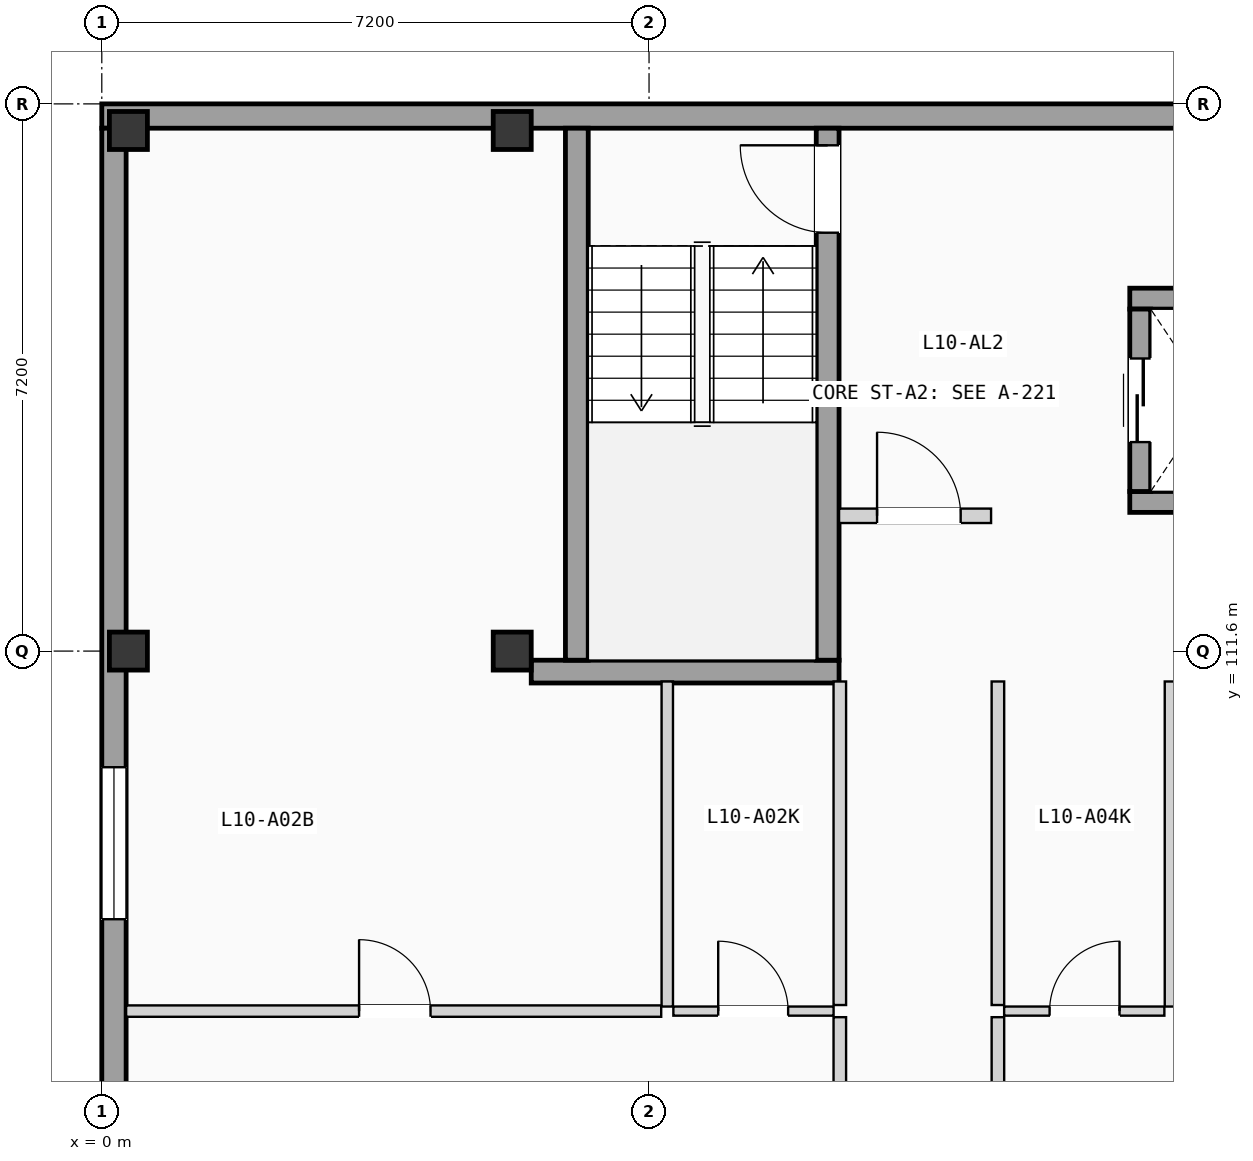
"""IFC4 building model, lengths in metres.
Left out: names, types, materials, properties, quantities, classifications, styles, units other than length and angle.
Written with IfcOpenShell. Run it as: python <this file> out.ifc"""

import sys

from ifc_helpers import new_model, si_unit, direction, frame, frame_2d, origin, origin_2d, place, context, subcontext, project, spatial, rectangle, extrude, element, fill, save


model = new_model("IFC4")
c1 = context("Model", 3, precision=1e-05, world=origin(), true_north=direction((0.0, 1.0)))
c2 = subcontext(c1, "Body", "Model", "MODEL_VIEW")
j1 = project(units=[si_unit("LENGTHUNIT", "METRE"), si_unit("PLANEANGLEUNIT", "RADIAN")], contexts=[c1])
p1 = place(None, origin())
s1 = spatial("IfcSite", under=j1, at=p1, CompositionType="ELEMENT")
p2 = place(p1, origin())
s2 = spatial("IfcBuilding", under=s1, at=p2, CompositionType="ELEMENT")
p3 = place(p2, frame((0.0, 0.0, 34.125)))
s3 = spatial("IfcBuildingStorey", under=s2, at=p3, CompositionType="ELEMENT", Elevation=34.125)
for number, where, z_axis, x_axis in (
    (1, (0.35, 111.6, 0.0), (0.0, 0.0, 1.0), (1.0, 0.0, 0.0)),
    (2, (0.35, 118.45, 0.0), (0.0, 0.0, 1.0), (1.0, 0.0, 0.0)),
    (3, (5.4, 111.6, 0.0), (0.0, 0.0, 1.0), (1.0, 0.0, 0.0)),
    (4, (5.4, 118.45, 0.0), (0.0, 0.0, 1.0), (1.0, 0.0, 0.0)),
):
    element("IfcColumn", number, at=place(p3, frame(where, z_axis=z_axis, x_axis=x_axis)), inside=s3, PredefinedType="COLUMN", context=c2, shape_type="SweptSolid", body=[
        extrude(rectangle(XDim=0.5, YDim=0.5, at=origin_2d()), origin(), (0.0, 0.0, 1.0), 3.15),
    ])
p4 = place(p3, frame((0.0, 118.64, 0.0), z_axis=(0.0, 0.0, 1.0), x_axis=(1.0, 0.0, 0.0)))
e5 = element("IfcWall", 5, at=p4, inside=s3, PredefinedType="SOLIDWALL", context=c2, shape_type="SweptSolid", body=[
    extrude(rectangle(XDim=21.6, YDim=0.32, at=frame_2d((10.8, 0.0))), origin(), (0.0, 0.0, 1.0), 2.89),
])
p5 = place(p3, frame((0.16, 68.72, 0.0), z_axis=(0.0, 0.0, 1.0), x_axis=(0.0, 1.0, 0.0)))
e6 = element("IfcWall", 6, at=p5, inside=s3, PredefinedType="SOLIDWALL", context=c2, shape_type="SweptSolid", body=[
    extrude(rectangle(XDim=49.76, YDim=0.32, at=frame_2d((24.88, 0.0))), origin(), (0.0, 0.0, 1.0), 2.89),
])
p6 = place(p5, frame((16.755, 0.0, 0.705)))
e7 = element("IfcOpeningElement", 7, at=p6, cuts=e6, PredefinedType="OPENING", context=c2, shape_type="SweptSolid", body=[
    extrude(rectangle(XDim=1.85, YDim=1.5, at=frame_2d((0.925, 0.75))), frame((0.0, 0.17, 0.0), z_axis=(0.0, -1.0, 0.0), x_axis=(1.0, 0.0, 0.0)), (0.0, 0.0, 1.0), 0.34),
])
p7 = place(p5, frame((9.62, 0.0, 0.555)))
e8 = element("IfcOpeningElement", 8, at=p7, cuts=e6, PredefinedType="OPENING", context=c2, shape_type="SweptSolid", body=[
    extrude(rectangle(XDim=1.85, YDim=1.65, at=frame_2d((0.925, 0.825))), frame((0.0, 0.17, 0.0), z_axis=(0.0, -1.0, 0.0), x_axis=(1.0, 0.0, 0.0)), (0.0, 0.0, 1.0), 0.34),
])
p8 = place(p5, frame((24.405, 0.0, 0.85)))
e9 = element("IfcOpeningElement", 9, at=p8, cuts=e6, PredefinedType="OPENING", context=c2, shape_type="SweptSolid", body=[
    extrude(rectangle(XDim=0.95, YDim=1.2, at=frame_2d((0.475, 0.6))), frame((0.0, 0.17, 0.0), z_axis=(0.0, -1.0, 0.0), x_axis=(1.0, 0.0, 0.0)), (0.0, 0.0, 1.0), 0.34),
])
p9 = place(p5, frame((33.159, 0.0, 0.9)))
e10 = element("IfcOpeningElement", 10, at=p9, cuts=e6, PredefinedType="OPENING", context=c2, shape_type="SweptSolid", body=[
    extrude(rectangle(XDim=2.0, YDim=1.2, at=frame_2d((1.0, 0.6))), frame((0.0, 0.17, 0.0), z_axis=(0.0, -1.0, 0.0), x_axis=(1.0, 0.0, 0.0)), (0.0, 0.0, 1.0), 0.34),
])
p10 = place(p5, frame((29.749, 0.0, 0.855)))
e11 = element("IfcOpeningElement", 11, at=p10, cuts=e6, PredefinedType="OPENING", context=c2, shape_type="SweptSolid", body=[
    extrude(rectangle(XDim=2.0, YDim=1.35, at=frame_2d((1.0, 0.675))), frame((0.0, 0.17, 0.0), z_axis=(0.0, -1.0, 0.0), x_axis=(1.0, 0.0, 0.0)), (0.0, 0.0, 1.0), 0.34),
])
p11 = place(p5, frame((39.352, 0.0, 0.705)))
e12 = element("IfcOpeningElement", 12, at=p11, cuts=e6, PredefinedType="OPENING", context=c2, shape_type="SweptSolid", body=[
    extrude(rectangle(XDim=2.0, YDim=1.5, at=frame_2d((1.0, 0.75))), frame((0.0, 0.17, 0.0), z_axis=(0.0, -1.0, 0.0), x_axis=(1.0, 0.0, 0.0)), (0.0, 0.0, 1.0), 0.34),
])
p12 = place(p3, frame((5.65, 111.33, 0.0), z_axis=(0.0, 0.0, 1.0), x_axis=(1.0, 0.0, 0.0)))
e13 = element("IfcWall", 13, at=p12, inside=s3, PredefinedType="SHEAR", context=c2, shape_type="SweptSolid", body=[
    extrude(rectangle(XDim=4.05, YDim=0.3, at=frame_2d((2.025, 0.0))), origin(), (0.0, 0.0, 1.0), 2.89),
])
p13 = place(p3, frame((6.25, 111.48, 0.0), z_axis=(0.0, 0.0, 1.0), x_axis=(0.0, 1.0, 0.0)))
e14 = element("IfcWall", 14, at=p13, inside=s3, PredefinedType="SHEAR", context=c2, shape_type="SweptSolid", body=[
    extrude(rectangle(XDim=7.0, YDim=0.3, at=frame_2d((3.5, 0.0))), origin(), (0.0, 0.0, 1.0), 2.89),
])
p14 = place(p3, frame((9.55, 111.48, 0.0), z_axis=(0.0, 0.0, 1.0), x_axis=(0.0, 1.0, 0.0)))
e15 = element("IfcWall", 15, at=p14, inside=s3, PredefinedType="SHEAR", context=c2, shape_type="SweptSolid", body=[
    extrude(rectangle(XDim=7.0, YDim=0.3, at=frame_2d((3.5, 0.0))), origin(), (0.0, 0.0, 1.0), 2.89),
])
p15 = place(p14, frame((5.625, 0.0, 0.0)))
e16 = element("IfcOpeningElement", 16, at=p15, cuts=e15, PredefinedType="OPENING", context=c2, shape_type="SweptSolid", body=[
    extrude(rectangle(XDim=1.15, YDim=2.12, at=frame_2d((0.575, 1.06))), frame((0.0, 0.16, 0.0), z_axis=(0.0, -1.0, 0.0), x_axis=(1.0, 0.0, 0.0)), (0.0, 0.0, 1.0), 0.32),
])
for number, where, z_axis, x_axis in (
    (17, (13.525, 113.562, 0.0), (0.0, 0.0, 1.0), (1.0, 0.0, 0.0)),
    (18, (13.525, 116.238, 0.0), (0.0, 0.0, 1.0), (1.0, 0.0, 0.0)),
):
    element("IfcWall", number, at=place(p3, frame(where, z_axis=z_axis, x_axis=x_axis)), inside=s3, PredefinedType="SHEAR", context=c2, shape_type="SweptSolid", body=[
        extrude(rectangle(XDim=2.15, YDim=0.275, at=frame_2d((1.075, 0.0))), origin(), (0.0, 0.0, 1.0), 2.89),
    ])
p16 = place(p3, frame((13.663, 113.7, 0.0), z_axis=(0.0, 0.0, 1.0), x_axis=(0.0, 1.0, 0.0)))
e19 = element("IfcWall", 19, at=p16, inside=s3, PredefinedType="SHEAR", context=c2, shape_type="SweptSolid", body=[
    extrude(rectangle(XDim=2.4, YDim=0.275, at=frame_2d((1.2, 0.0))), origin(), (0.0, 0.0, 1.0), 2.89),
])
p17 = place(p16, frame((0.65, 0.0, 0.0)))
e20 = element("IfcOpeningElement", 20, at=p17, cuts=e19, PredefinedType="OPENING", context=c2, shape_type="SweptSolid", body=[
    extrude(rectangle(XDim=1.1, YDim=2.15, at=frame_2d((0.55, 1.075))), frame((0.0, 0.147, 0.0), z_axis=(0.0, -1.0, 0.0), x_axis=(1.0, 0.0, 0.0)), (0.0, 0.0, 1.0), 0.295),
])
p18 = place(p3, frame((9.7, 113.38, 0.0), z_axis=(0.0, 0.0, 1.0), x_axis=(1.0, 0.0, 0.0)))
e21 = element("IfcWall", 21, at=p18, inside=s3, PredefinedType="PARTITIONING", context=c2, shape_type="SweptSolid", body=[
    extrude(rectangle(XDim=2.0, YDim=0.19, at=frame_2d((1.0, 0.0))), origin(), (0.0, 0.0, 1.0), 2.87),
])
p19 = place(p18, frame((0.5, 0.0, 0.0)))
e22 = element("IfcOpeningElement", 22, at=p19, cuts=e21, PredefinedType="OPENING", context=c2, shape_type="SweptSolid", body=[
    extrude(rectangle(XDim=1.1, YDim=2.12, at=frame_2d((0.55, 1.06))), frame((0.0, 0.105, 0.0), z_axis=(0.0, -1.0, 0.0), x_axis=(1.0, 0.0, 0.0)), (0.0, 0.0, 1.0), 0.21),
])
p20 = place(p3, frame((9.71, 101.627, 0.0), z_axis=(0.0, 0.0, 1.0), x_axis=(0.0, 1.0, 0.0)))
e23 = element("IfcWall", 23, at=p20, inside=s3, PredefinedType="PARTITIONING", context=c2, shape_type="SweptSolid", body=[
    extrude(rectangle(XDim=5.156, YDim=0.165, at=frame_2d((2.578, 0.0))), origin(), (0.0, 0.0, 1.0), 2.87),
])
p21 = place(p20, frame((2.088, 0.0, 0.0)))
e24 = element("IfcOpeningElement", 24, at=p21, cuts=e23, PredefinedType="OPENING", context=c2, shape_type="SweptSolid", body=[
    extrude(rectangle(XDim=0.98, YDim=2.08, at=frame_2d((0.49, 1.04))), frame((0.0, 0.093, 0.0), z_axis=(0.0, -1.0, 0.0), x_axis=(1.0, 0.0, 0.0)), (0.0, 0.0, 1.0), 0.185),
])
p22 = place(p3, frame((9.71, 106.943, 0.0), z_axis=(0.0, 0.0, 1.0), x_axis=(0.0, 1.0, 0.0)))
e25 = element("IfcWall", 25, at=p22, inside=s3, PredefinedType="PARTITIONING", context=c2, shape_type="SweptSolid", body=[
    extrude(rectangle(XDim=4.257, YDim=0.165, at=frame_2d((2.128, 0.0))), origin(), (0.0, 0.0, 1.0), 2.87),
])
p23 = place(p3, frame((11.79, 101.627, 0.0), z_axis=(0.0, 0.0, 1.0), x_axis=(0.0, 1.0, 0.0)))
e26 = element("IfcWall", 26, at=p23, inside=s3, PredefinedType="PARTITIONING", context=c2, shape_type="SweptSolid", body=[
    extrude(rectangle(XDim=5.156, YDim=0.165, at=frame_2d((2.578, 0.0))), origin(), (0.0, 0.0, 1.0), 2.87),
])
p24 = place(p23, frame((2.088, 0.0, 0.0)))
e27 = element("IfcOpeningElement", 27, at=p24, cuts=e26, PredefinedType="OPENING", context=c2, shape_type="SweptSolid", body=[
    extrude(rectangle(XDim=0.98, YDim=2.08, at=frame_2d((0.49, 1.04))), frame((0.0, 0.093, 0.0), z_axis=(0.0, -1.0, 0.0), x_axis=(1.0, 0.0, 0.0)), (0.0, 0.0, 1.0), 0.185),
])
p25 = place(p3, frame((11.79, 106.943, 0.0), z_axis=(0.0, 0.0, 1.0), x_axis=(0.0, 1.0, 0.0)))
e28 = element("IfcWall", 28, at=p25, inside=s3, PredefinedType="PARTITIONING", context=c2, shape_type="SweptSolid", body=[
    extrude(rectangle(XDim=4.257, YDim=0.165, at=frame_2d((2.128, 0.0))), origin(), (0.0, 0.0, 1.0), 2.87),
])
p26 = place(p3, frame((7.52, 106.863, 0.0), z_axis=(0.0, 0.0, 1.0), x_axis=(1.0, 0.0, 0.0)))
e29 = element("IfcWall", 29, at=p26, inside=s3, PredefinedType="PARTITIONING", context=c2, shape_type="SweptSolid", body=[
    extrude(rectangle(XDim=2.108, YDim=0.12, at=frame_2d((1.054, 0.0))), origin(), (0.0, 0.0, 1.0), 2.87),
])
p27 = place(p26, frame((0.59, 0.0, 0.0)))
e30 = element("IfcOpeningElement", 30, at=p27, cuts=e29, PredefinedType="OPENING", context=c2, shape_type="SweptSolid", body=[
    extrude(rectangle(XDim=0.92, YDim=2.02, at=frame_2d((0.46, 1.01))), frame((0.0, 0.07, 0.0), z_axis=(0.0, -1.0, 0.0), x_axis=(1.0, 0.0, 0.0)), (0.0, 0.0, 1.0), 0.14),
])
p28 = place(p3, frame((0.32, 106.863, 0.0), z_axis=(0.0, 0.0, 1.0), x_axis=(1.0, 0.0, 0.0)))
e31 = element("IfcWall", 31, at=p28, inside=s3, PredefinedType="PARTITIONING", context=c2, shape_type="SweptSolid", body=[
    extrude(rectangle(XDim=7.04, YDim=0.15, at=frame_2d((3.52, 0.0))), origin(), (0.0, 0.0, 1.0), 2.87),
])
p29 = place(p28, frame((3.065, 0.0, 0.0)))
e32 = element("IfcOpeningElement", 32, at=p29, cuts=e31, PredefinedType="OPENING", context=c2, shape_type="SweptSolid", body=[
    extrude(rectangle(XDim=0.94, YDim=2.06, at=frame_2d((0.47, 1.03))), frame((0.0, 0.085, 0.0), z_axis=(0.0, -1.0, 0.0), x_axis=(1.0, 0.0, 0.0)), (0.0, 0.0, 1.0), 0.17),
])
p30 = place(p3, frame((7.44, 106.923, 0.0), z_axis=(0.0, 0.0, 1.0), x_axis=(0.0, 1.0, 0.0)))
e33 = element("IfcWall", 33, at=p30, inside=s3, PredefinedType="PARTITIONING", context=c2, shape_type="SweptSolid", body=[
    extrude(rectangle(XDim=4.277, YDim=0.15, at=frame_2d((2.138, 0.0))), origin(), (0.0, 0.0, 1.0), 2.87),
])
p31 = place(p3, frame((11.872, 106.863, 0.0), z_axis=(0.0, 0.0, 1.0), x_axis=(1.0, 0.0, 0.0)))
e34 = element("IfcWall", 34, at=p31, inside=s3, PredefinedType="PARTITIONING", context=c2, shape_type="SweptSolid", body=[
    extrude(rectangle(XDim=2.108, YDim=0.12, at=frame_2d((1.054, 0.0))), origin(), (0.0, 0.0, 1.0), 2.87),
])
p32 = place(p31, frame((0.598, 0.0, 0.0)))
e35 = element("IfcOpeningElement", 35, at=p32, cuts=e34, PredefinedType="OPENING", context=c2, shape_type="SweptSolid", body=[
    extrude(rectangle(XDim=0.92, YDim=2.02, at=frame_2d((0.46, 1.01))), frame((0.0, 0.07, 0.0), z_axis=(0.0, -1.0, 0.0), x_axis=(1.0, 0.0, 0.0)), (0.0, 0.0, 1.0), 0.14),
])
p33 = place(p3, frame((14.06, 106.923, 0.0), z_axis=(0.0, 0.0, 1.0), x_axis=(0.0, 1.0, 0.0)))
e36 = element("IfcWall", 36, at=p33, inside=s3, PredefinedType="PARTITIONING", context=c2, shape_type="SweptSolid", body=[
    extrude(rectangle(XDim=4.277, YDim=0.15, at=frame_2d((2.138, 0.0))), origin(), (0.0, 0.0, 1.0), 2.87),
])
p34 = place(p11, origin())
e37 = element("IfcWindow", 37, at=p34, inside=s3, PartitioningType="DOUBLE_PANEL_VERTICAL", PredefinedType="WINDOW", context=c2, shape_type="SweptSolid", body=[
    extrude(rectangle(XDim=2.0, YDim=1.5, at=frame_2d((1.0, 0.75))), frame((0.0, 0.03, 0.0), z_axis=(0.0, -1.0, 0.0), x_axis=(1.0, 0.0, 0.0)), (0.0, 0.0, 1.0), 0.06),
])
fill(e12, e37)
p35 = place(p15, origin())
e38 = element("IfcDoor", 38, at=p35, inside=s3, OperationType="SINGLE_SWING_RIGHT", PredefinedType="DOOR", context=c2, shape_type="SweptSolid", body=[
    extrude(rectangle(XDim=1.15, YDim=2.12, at=frame_2d((0.575, 1.06))), frame((0.0, 0.025, 0.0), z_axis=(0.0, -1.0, 0.0), x_axis=(1.0, 0.0, 0.0)), (0.0, 0.0, 1.0), 0.05),
])
fill(e16, e38)
p36 = place(p17, origin())
e39 = element("IfcDoor", 39, at=p36, inside=s3, OperationType="SLIDING_TO_LEFT", PredefinedType="DOOR", context=c2, shape_type="SweptSolid", body=[
    extrude(rectangle(XDim=1.1, YDim=2.15, at=frame_2d((0.55, 1.075))), frame((0.0, 0.025, 0.0), z_axis=(0.0, -1.0, 0.0), x_axis=(1.0, 0.0, 0.0)), (0.0, 0.0, 1.0), 0.05),
])
fill(e20, e39)
p37 = place(p19, origin())
e40 = element("IfcDoor", 40, at=p37, inside=s3, OperationType="SINGLE_SWING_LEFT", PredefinedType="DOOR", context=c2, shape_type="SweptSolid", body=[
    extrude(rectangle(XDim=1.1, YDim=2.12, at=frame_2d((0.55, 1.06))), frame((0.0, 0.025, 0.0), z_axis=(0.0, -1.0, 0.0), x_axis=(1.0, 0.0, 0.0)), (0.0, 0.0, 1.0), 0.05),
])
fill(e22, e40)
p38 = place(p27, origin())
e41 = element("IfcDoor", 41, at=p38, inside=s3, OperationType="SINGLE_SWING_LEFT", PredefinedType="DOOR", context=c2, shape_type="SweptSolid", body=[
    extrude(rectangle(XDim=0.92, YDim=2.02, at=frame_2d((0.46, 1.01))), frame((0.0, 0.025, 0.0), z_axis=(0.0, -1.0, 0.0), x_axis=(1.0, 0.0, 0.0)), (0.0, 0.0, 1.0), 0.05),
])
fill(e30, e41)
p39 = place(p29, origin())
e42 = element("IfcDoor", 42, at=p39, inside=s3, OperationType="SINGLE_SWING_LEFT", PredefinedType="DOOR", context=c2, shape_type="SweptSolid", body=[
    extrude(rectangle(XDim=0.94, YDim=2.06, at=frame_2d((0.47, 1.03))), frame((0.0, 0.025, 0.0), z_axis=(0.0, -1.0, 0.0), x_axis=(1.0, 0.0, 0.0)), (0.0, 0.0, 1.0), 0.05),
])
fill(e32, e42)
p40 = place(p32, origin())
e43 = element("IfcDoor", 43, at=p40, inside=s3, OperationType="SINGLE_SWING_RIGHT", PredefinedType="DOOR", context=c2, shape_type="SweptSolid", body=[
    extrude(rectangle(XDim=0.92, YDim=2.02, at=frame_2d((0.46, 1.01))), frame((0.0, 0.025, 0.0), z_axis=(0.0, -1.0, 0.0), x_axis=(1.0, 0.0, 0.0)), (0.0, 0.0, 1.0), 0.05),
])
fill(e35, e43)
save(model, sys.argv[1])
